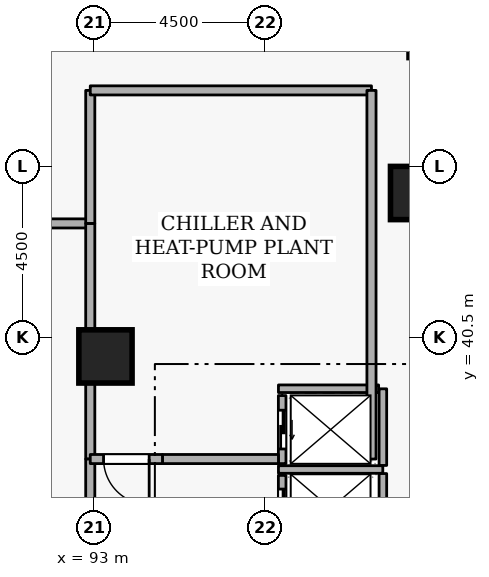
"""IFC4 building model, lengths in metres.
Left out: names, types, materials, properties, quantities, classifications, styles, units other than length and angle.
Written with IfcOpenShell. Run it as: python <this file> out.ifc"""

import sys

from ifc_helpers import new_model, si_unit, direction, frame, frame_2d, origin, origin_2d, place, context, subcontext, project, spatial, rectangle, i_section, extrude, element, fill, save


model = new_model("IFC4")
c1 = context("Model", 3, precision=1e-05, world=origin(), true_north=direction((0.0, 1.0)))
c2 = subcontext(c1, "Body", "Model", "MODEL_VIEW")
j1 = project(units=[si_unit("LENGTHUNIT", "METRE"), si_unit("PLANEANGLEUNIT", "RADIAN")], contexts=[c1])
p1 = place(None, origin())
s1 = spatial("IfcSite", under=j1, at=p1, CompositionType="ELEMENT")
p2 = place(p1, origin())
s2 = spatial("IfcBuilding", under=s1, at=p2, CompositionType="ELEMENT")
p3 = place(p2, frame((0.0, 0.0, 71.7)))
s3 = spatial("IfcBuildingStorey", under=s2, at=p3, CompositionType="ELEMENT", Elevation=71.7)
for number, where, z_axis, x_axis in (
    (1, (101.5, 44.3, 0.0), (0.0, 0.0, 1.0), (1.0, 0.0, 0.0)),
    (2, (93.3, 40.0, 0.0), (0.0, 0.0, 1.0), (1.0, 0.0, 0.0)),
):
    element("IfcColumn", number, at=place(p3, frame(where, z_axis=z_axis, x_axis=x_axis)), inside=s3, PredefinedType="COLUMN", context=c2, shape_type="SweptSolid", body=[
        extrude(rectangle(XDim=1.4, YDim=1.4, at=origin_2d()), origin(), (0.0, 0.0, 1.0), 4.2),
    ])
p4 = place(p3, frame((101.5, 48.1, 0.0), z_axis=(0.0, 0.0, 1.0), x_axis=(1.0, 0.0, 0.0)))
e3 = element("IfcColumn", 3, at=p4, inside=s3, PredefinedType="COLUMN", context=c2, shape_type="SweptSolid", body=[
    extrude(i_section(OverallWidth=0.424, OverallDepth=0.475, WebThickness=0.048, FlangeThickness=0.077, FilletRadius=0.015, at=origin_2d()), origin(), (0.0, 0.0, 1.0), 4.2),
])
p5 = place(p3, frame((97.95, 36.87, 0.0), z_axis=(0.0, 0.0, 1.0), x_axis=(0.0, -1.0, 0.0)))
e4 = element("IfcWall", 4, at=p5, inside=s3, PredefinedType="STANDARD", context=c2, shape_type="SweptSolid", body=[
    extrude(rectangle(XDim=1.74, YDim=0.2, at=frame_2d((0.87, 0.0))), origin(), (0.0, 0.0, 1.0), 3.86),
])
p6 = place(p5, frame((0.36, 0.0, 0.0)))
e5 = element("IfcOpeningElement", 5, at=p6, cuts=e4, PredefinedType="OPENING", context=c2, shape_type="SweptSolid", body=[
    extrude(rectangle(XDim=1.02, YDim=2.06, at=frame_2d((0.51, 1.03))), frame((0.0, 0.11, 0.0), z_axis=(0.0, -1.0, 0.0), x_axis=(1.0, 0.0, 0.0)), (0.0, 0.0, 1.0), 0.22),
])
p7 = place(p3, frame((97.95, 38.97, 0.0), z_axis=(0.0, 0.0, 1.0), x_axis=(0.0, -1.0, 0.0)))
e6 = element("IfcWall", 6, at=p7, inside=s3, PredefinedType="STANDARD", context=c2, shape_type="SweptSolid", body=[
    extrude(rectangle(XDim=1.79, YDim=0.2, at=frame_2d((0.895, 0.0))), origin(), (0.0, 0.0, 1.0), 3.86),
])
p8 = place(p7, frame((0.385, 0.0, 0.0)))
e7 = element("IfcOpeningElement", 7, at=p8, cuts=e6, PredefinedType="OPENING", context=c2, shape_type="SweptSolid", body=[
    extrude(rectangle(XDim=1.02, YDim=2.06, at=frame_2d((0.51, 1.03))), frame((0.0, 0.11, 0.0), z_axis=(0.0, -1.0, 0.0), x_axis=(1.0, 0.0, 0.0)), (0.0, 0.0, 1.0), 0.22),
])
p9 = place(p3, frame((97.852, 37.025, 0.0), z_axis=(0.0, 0.0, 1.0), x_axis=(1.0, 0.0, 0.0)))
e8 = element("IfcWall", 8, at=p9, inside=s3, PredefinedType="STANDARD", context=c2, shape_type="SweptSolid", body=[
    extrude(rectangle(XDim=2.746, YDim=0.2, at=frame_2d((1.373, 0.0))), origin(), (0.0, 0.0, 1.0), 3.86),
])
p10 = place(p3, frame((100.6, 35.062, 0.0), z_axis=(0.0, 0.0, 1.0), x_axis=(0.0, 1.0, 0.0)))
e9 = element("IfcWall", 9, at=p10, inside=s3, PredefinedType="STANDARD", context=c2, shape_type="SweptSolid", body=[
    extrude(rectangle(XDim=1.856, YDim=0.2, at=frame_2d((0.928, 0.0))), origin(), (0.0, 0.0, 1.0), 3.86),
])
p11 = place(p3, frame((100.6, 37.132, 0.0), z_axis=(0.0, 0.0, 1.0), x_axis=(0.0, 1.0, 0.0)))
e10 = element("IfcWall", 10, at=p11, inside=s3, PredefinedType="STANDARD", context=c2, shape_type="SweptSolid", body=[
    extrude(rectangle(XDim=2.016, YDim=0.2, at=frame_2d((1.008, 0.0))), origin(), (0.0, 0.0, 1.0), 3.86),
])
p12 = place(p3, frame((97.852, 39.15, 0.0), z_axis=(0.0, 0.0, 1.0), x_axis=(1.0, 0.0, 0.0)))
e11 = element("IfcWall", 11, at=p12, inside=s3, PredefinedType="STANDARD", context=c2, shape_type="SweptSolid", body=[
    extrude(rectangle(XDim=2.636, YDim=0.2, at=frame_2d((1.318, 0.0))), origin(), (0.0, 0.0, 1.0), 3.86),
])
p13 = place(p3, frame((88.5, 43.5, 0.0), z_axis=(0.0, 0.0, 1.0), x_axis=(1.0, 0.0, 0.0)))
e12 = element("IfcWall", 12, at=p13, inside=s3, PredefinedType="STANDARD", context=c2, shape_type="SweptSolid", body=[
    extrude(rectangle(XDim=4.4, YDim=0.24, at=frame_2d((2.2, 0.0))), origin(), (0.0, 0.0, 1.0), 3.86),
])
p14 = place(p3, frame((92.9, 43.5, 0.0), z_axis=(0.0, 0.0, 1.0), x_axis=(0.0, -1.0, 0.0)))
e13 = element("IfcWall", 13, at=p14, inside=s3, PredefinedType="STANDARD", context=c2, shape_type="SweptSolid", body=[
    extrude(rectangle(XDim=6.2, YDim=0.24, at=frame_2d((3.1, 0.0))), origin(), (0.0, 0.0, 1.0), 3.86),
])
p15 = place(p3, frame((92.9, 37.3, 0.0), z_axis=(0.0, 0.0, 1.0), x_axis=(0.0, -1.0, 0.0)))
e14 = element("IfcWall", 14, at=p15, inside=s3, PredefinedType="STANDARD", context=c2, shape_type="SweptSolid", body=[
    extrude(rectangle(XDim=2.9, YDim=0.24, at=frame_2d((1.45, 0.0))), origin(), (0.0, 0.0, 1.0), 3.86),
])
p16 = place(p3, frame((92.9, 43.5, 0.0), z_axis=(0.0, 0.0, 1.0), x_axis=(0.0, 1.0, 0.0)))
e15 = element("IfcWall", 15, at=p16, inside=s3, PredefinedType="STANDARD", context=c2, shape_type="SweptSolid", body=[
    extrude(rectangle(XDim=3.5, YDim=0.24, at=frame_2d((1.75, 0.0))), origin(), (0.0, 0.0, 1.0), 3.86),
])
p17 = place(p3, frame((92.9, 47.0, 0.0), z_axis=(0.0, 0.0, 1.0), x_axis=(1.0, 0.0, 0.0)))
e16 = element("IfcWall", 16, at=p17, inside=s3, PredefinedType="STANDARD", context=c2, shape_type="SweptSolid", body=[
    extrude(rectangle(XDim=7.4, YDim=0.24, at=frame_2d((3.7, 0.0))), origin(), (0.0, 0.0, 1.0), 3.86),
])
p18 = place(p3, frame((100.3, 47.0, 0.0), z_axis=(0.0, 0.0, 1.0), x_axis=(0.0, -1.0, 0.0)))
e17 = element("IfcWall", 17, at=p18, inside=s3, PredefinedType="STANDARD", context=c2, shape_type="SweptSolid", body=[
    extrude(rectangle(XDim=9.7, YDim=0.24, at=frame_2d((4.85, 0.0))), origin(), (0.0, 0.0, 1.0), 3.86),
])
p19 = place(p3, frame((97.852, 37.3, 0.0), z_axis=(0.0, 0.0, 1.0), x_axis=(-1.0, 0.0, 0.0)))
e18 = element("IfcWall", 18, at=p19, inside=s3, PredefinedType="STANDARD", context=c2, shape_type="SweptSolid", body=[
    extrude(rectangle(XDim=3.052, YDim=0.24, at=frame_2d((1.526, 0.0))), origin(), (0.0, 0.0, 1.0), 3.86),
])
p20 = place(p3, frame((94.8, 37.3, 0.0), z_axis=(0.0, 0.0, 1.0), x_axis=(-1.0, 0.0, 0.0)))
e19 = element("IfcWall", 19, at=p20, inside=s3, PredefinedType="STANDARD", context=c2, shape_type="SweptSolid", body=[
    extrude(rectangle(XDim=1.9, YDim=0.24, at=frame_2d((0.95, 0.0))), origin(), (0.0, 0.0, 1.0), 3.86),
])
p21 = place(p20, frame((0.35, 0.0, 0.0)))
e20 = element("IfcOpeningElement", 20, at=p21, cuts=e19, PredefinedType="OPENING", context=c2, shape_type="SweptSolid", body=[
    extrude(rectangle(XDim=1.2, YDim=2.1, at=frame_2d((0.6, 1.05))), frame((0.0, 0.13, 0.0), z_axis=(0.0, -1.0, 0.0), x_axis=(1.0, 0.0, 0.0)), (0.0, 0.0, 1.0), 0.26),
])
p22 = place(p6, origin())
e21 = element("IfcDoor", 21, at=p22, inside=s3, OperationType="SLIDING_TO_LEFT", PredefinedType="DOOR", context=c2, shape_type="SweptSolid", body=[
    extrude(rectangle(XDim=1.02, YDim=2.06, at=frame_2d((0.51, 1.03))), frame((0.0, 0.025, 0.0), z_axis=(0.0, -1.0, 0.0), x_axis=(1.0, 0.0, 0.0)), (0.0, 0.0, 1.0), 0.05),
])
fill(e5, e21)
p23 = place(p8, origin())
e22 = element("IfcDoor", 22, at=p23, inside=s3, OperationType="SLIDING_TO_LEFT", PredefinedType="DOOR", context=c2, shape_type="SweptSolid", body=[
    extrude(rectangle(XDim=1.02, YDim=2.06, at=frame_2d((0.51, 1.03))), frame((0.0, 0.025, 0.0), z_axis=(0.0, -1.0, 0.0), x_axis=(1.0, 0.0, 0.0)), (0.0, 0.0, 1.0), 0.05),
])
fill(e7, e22)
p24 = place(p21, origin())
e23 = element("IfcDoor", 23, at=p24, inside=s3, OperationType="SINGLE_SWING_LEFT", PredefinedType="DOOR", context=c2, shape_type="SweptSolid", body=[
    extrude(rectangle(XDim=1.2, YDim=2.1, at=frame_2d((0.6, 1.05))), frame((0.0, 0.025, 0.0), z_axis=(0.0, -1.0, 0.0), x_axis=(1.0, 0.0, 0.0)), (0.0, 0.0, 1.0), 0.05),
])
fill(e20, e23)
save(model, sys.argv[1])
